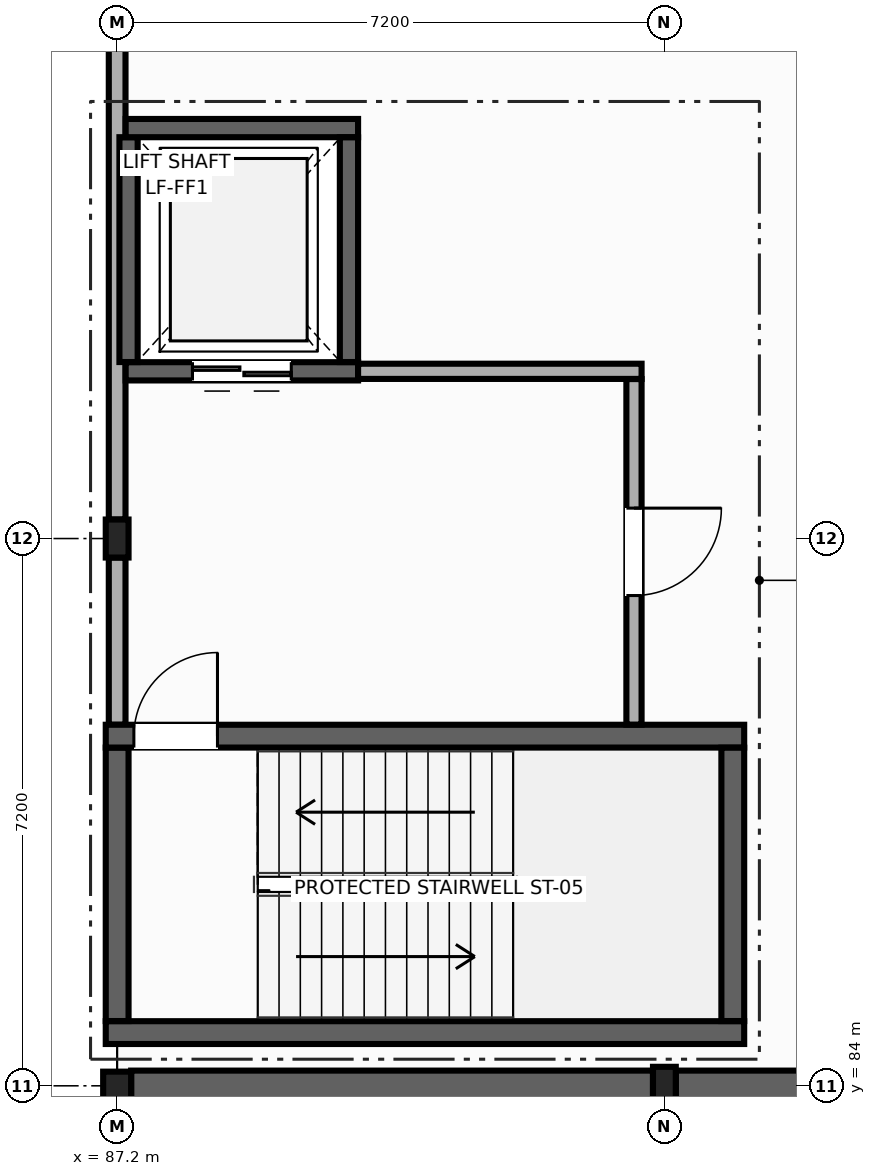
"""IFC4 building model, lengths in metres.
Left out: names, types, materials, properties, quantities, classifications, styles, units other than length and angle.
Written with IfcOpenShell. Run it as: python <this file> out.ifc"""

import sys

from ifc_helpers import new_model, si_unit, direction, frame, frame_2d, origin, origin_2d, place, context, subcontext, project, spatial, rectangle, i_section, extrude, element, fill, save


model = new_model("IFC4")
c1 = context("Model", 3, precision=1e-05, world=origin(), true_north=direction((0.0, 1.0)))
c2 = subcontext(c1, "Body", "Model", "MODEL_VIEW")
j1 = project(units=[si_unit("LENGTHUNIT", "METRE"), si_unit("PLANEANGLEUNIT", "RADIAN")], contexts=[c1])
p1 = place(None, origin())
s1 = spatial("IfcSite", under=j1, at=p1, CompositionType="ELEMENT")
p2 = place(p1, origin())
s2 = spatial("IfcBuilding", under=s1, at=p2, CompositionType="ELEMENT")
p3 = place(p2, frame((0.0, 0.0, 5.4)))
s3 = spatial("IfcBuildingStorey", under=s2, at=p3, CompositionType="ELEMENT", Elevation=5.4)
p4 = place(p3, frame((87.2, 84.0, 0.0), z_axis=(0.0, 0.0, 1.0), x_axis=(0.0, 1.0, 0.0)))
e1 = element("IfcColumn", 1, at=p4, inside=s3, PredefinedType="COLUMN", context=c2, shape_type="SweptSolid", body=[
    extrude(i_section(OverallWidth=0.373, OverallDepth=0.368, WebThickness=0.014, FlangeThickness=0.024, at=origin_2d()), origin(), (0.0, 0.0, 1.0), 4.5),
])
for number, where, z_axis, x_axis in (
    (2, (94.4, 84.0, 0.0), (0.0, 0.0, 1.0), (1.0, 0.0, 0.0)),
    (3, (87.2, 91.2, 0.0), (0.0, 0.0, 1.0), (1.0, 0.0, 0.0)),
):
    element("IfcColumn", number, at=place(p3, frame(where, z_axis=z_axis, x_axis=x_axis)), inside=s3, PredefinedType="COLUMN", context=c2, shape_type="SweptSolid", body=[
        extrude(i_section(OverallWidth=0.3, OverallDepth=0.5, WebThickness=0.014, FlangeThickness=0.028, at=origin_2d()), origin(), (0.0, 0.0, 1.0), 4.5),
    ])
p5 = place(p3, frame((87.2, 88.75, 0.0), z_axis=(0.0, 0.0, 1.0), x_axis=(0.0, 1.0, 0.0)))
e4 = element("IfcWall", 4, at=p5, inside=s3, PredefinedType="SOLIDWALL", context=c2, shape_type="SweptSolid", body=[
    extrude(rectangle(XDim=2.2, YDim=0.22, at=frame_2d((1.1, 0.0))), origin(), (0.0, 0.0, 1.0), 3.515),
])
p6 = place(p3, frame((87.2, 91.45, 0.0), z_axis=(0.0, 0.0, 1.0), x_axis=(0.0, 1.0, 0.0)))
e5 = element("IfcWall", 5, at=p6, inside=s3, PredefinedType="SOLIDWALL", context=c2, shape_type="SweptSolid", body=[
    extrude(rectangle(XDim=6.8, YDim=0.22, at=frame_2d((3.4, 0.0))), origin(), (0.0, 0.0, 1.0), 3.555),
])
p7 = place(p3, frame((95.45, 84.7, 0.0), z_axis=(0.0, 0.0, 1.0), x_axis=(-1.0, 0.0, 0.0)))
e6 = element("IfcWall", 6, at=p7, inside=s3, PredefinedType="SHEAR", context=c2, shape_type="SweptSolid", body=[
    extrude(rectangle(XDim=8.4, YDim=0.3, at=frame_2d((4.2, 0.0))), origin(), (0.0, 0.0, 1.0), 4.26),
])
p8 = place(p3, frame((87.2, 84.852, 0.0), z_axis=(0.0, 0.0, 1.0), x_axis=(0.0, 1.0, 0.0)))
e7 = element("IfcWall", 7, at=p8, inside=s3, PredefinedType="SHEAR", context=c2, shape_type="SweptSolid", body=[
    extrude(rectangle(XDim=3.598, YDim=0.3, at=frame_2d((1.799, 0.0))), origin(), (0.0, 0.0, 1.0), 4.26),
])
p9 = place(p3, frame((87.05, 88.6, 0.0), z_axis=(0.0, 0.0, 1.0), x_axis=(1.0, 0.0, 0.0)))
e8 = element("IfcWall", 8, at=p9, inside=s3, PredefinedType="SHEAR", context=c2, shape_type="SweptSolid", body=[
    extrude(rectangle(XDim=8.4, YDim=0.3, at=frame_2d((4.2, 0.0))), origin(), (0.0, 0.0, 1.0), 4.26),
])
p10 = place(p9, frame((0.37, 0.0, 0.0)))
e9 = element("IfcOpeningElement", 9, at=p10, cuts=e8, PredefinedType="OPENING", context=c2, shape_type="SweptSolid", body=[
    extrude(rectangle(XDim=1.1, YDim=2.15, at=frame_2d((0.55, 1.075))), frame((0.0, 0.16, 0.0), z_axis=(0.0, -1.0, 0.0), x_axis=(1.0, 0.0, 0.0)), (0.0, 0.0, 1.0), 0.32),
])
p11 = place(p3, frame((95.3, 88.448, 0.0), z_axis=(0.0, 0.0, 1.0), x_axis=(0.0, -1.0, 0.0)))
e10 = element("IfcWall", 10, at=p11, inside=s3, PredefinedType="SHEAR", context=c2, shape_type="SweptSolid", body=[
    extrude(rectangle(XDim=3.596, YDim=0.3, at=frame_2d((1.798, 0.0))), origin(), (0.0, 0.0, 1.0), 4.26),
])
p12 = place(p3, frame((90.37, 93.4, 0.0), z_axis=(0.0, 0.0, 1.0), x_axis=(-1.0, 0.0, 0.0)))
e11 = element("IfcWall", 11, at=p12, inside=s3, PredefinedType="SHEAR", context=c2, shape_type="SweptSolid", body=[
    extrude(rectangle(XDim=3.058, YDim=0.24, at=frame_2d((1.529, 0.0))), origin(), (0.0, 0.0, 1.0), 4.26),
])
p13 = place(p12, frame((0.879, 0.0, 0.0)))
e12 = element("IfcOpeningElement", 12, at=p13, cuts=e11, PredefinedType="OPENING", context=c2, shape_type="SweptSolid", body=[
    extrude(rectangle(XDim=1.3, YDim=2.15, at=frame_2d((0.65, 1.075))), frame((0.0, 0.13, 0.0), z_axis=(0.0, -1.0, 0.0), x_axis=(1.0, 0.0, 0.0)), (0.0, 0.0, 1.0), 0.26),
])
p14 = place(p3, frame((87.35, 93.522, 0.0), z_axis=(0.0, 0.0, 1.0), x_axis=(0.0, 1.0, 0.0)))
e13 = element("IfcWall", 13, at=p14, inside=s3, PredefinedType="SHEAR", context=c2, shape_type="SweptSolid", body=[
    extrude(rectangle(XDim=2.958, YDim=0.24, at=frame_2d((1.479, 0.0))), origin(), (0.0, 0.0, 1.0), 4.26),
])
p15 = place(p3, frame((87.312, 96.6, 0.0), z_axis=(0.0, 0.0, 1.0), x_axis=(1.0, 0.0, 0.0)))
e14 = element("IfcWall", 14, at=p15, inside=s3, PredefinedType="SHEAR", context=c2, shape_type="SweptSolid", body=[
    extrude(rectangle(XDim=3.058, YDim=0.24, at=frame_2d((1.529, 0.0))), origin(), (0.0, 0.0, 1.0), 4.26),
])
p16 = place(p3, frame((90.25, 96.478, 0.0), z_axis=(0.0, 0.0, 1.0), x_axis=(0.0, -1.0, 0.0)))
e15 = element("IfcWall", 15, at=p16, inside=s3, PredefinedType="SHEAR", context=c2, shape_type="SweptSolid", body=[
    extrude(rectangle(XDim=2.956, YDim=0.24, at=frame_2d((1.478, 0.0))), origin(), (0.0, 0.0, 1.0), 4.26),
])
p17 = place(p3, frame((90.37, 93.4, 0.0), z_axis=(0.0, 0.0, 1.0), x_axis=(1.0, 0.0, 0.0)))
e16 = element("IfcWall", 16, at=p17, inside=s3, PredefinedType="PARTITIONING", context=c2, shape_type="SweptSolid", body=[
    extrude(rectangle(XDim=3.73, YDim=0.2, at=frame_2d((1.865, 0.0))), origin(), (0.0, 0.0, 1.0), 4.26),
])
p18 = place(p3, frame((94.0, 93.298, 0.0), z_axis=(0.0, 0.0, 1.0), x_axis=(0.0, -1.0, 0.0)))
e17 = element("IfcWall", 17, at=p18, inside=s3, PredefinedType="PARTITIONING", context=c2, shape_type="SweptSolid", body=[
    extrude(rectangle(XDim=4.546, YDim=0.2, at=frame_2d((2.273, 0.0))), origin(), (0.0, 0.0, 1.0), 4.26),
])
p19 = place(p18, frame((1.698, 0.0, 0.0)))
e18 = element("IfcOpeningElement", 18, at=p19, cuts=e17, PredefinedType="OPENING", context=c2, shape_type="SweptSolid", body=[
    extrude(rectangle(XDim=1.15, YDim=2.15, at=frame_2d((0.575, 1.075))), frame((0.0, 0.11, 0.0), z_axis=(0.0, -1.0, 0.0), x_axis=(1.0, 0.0, 0.0)), (0.0, 0.0, 1.0), 0.22),
])
p20 = place(p3, frame((87.384, 84.0, 0.0), z_axis=(0.0, 0.0, 1.0), x_axis=(1.0, 0.0, 0.0)))
e19 = element("IfcWall", 19, at=p20, inside=s3, PredefinedType="SHEAR", context=c2, shape_type="SweptSolid", body=[
    extrude(rectangle(XDim=6.866, YDim=0.4, at=frame_2d((3.433, 0.0))), origin(), (0.0, 0.0, 1.0), 4.22),
])
p21 = place(p3, frame((94.55, 84.0, 0.0), z_axis=(0.0, 0.0, 1.0), x_axis=(1.0, 0.0, 0.0)))
e20 = element("IfcWall", 20, at=p21, inside=s3, PredefinedType="SHEAR", context=c2, shape_type="SweptSolid", body=[
    extrude(rectangle(XDim=6.8, YDim=0.4, at=frame_2d((3.4, 0.0))), origin(), (0.0, 0.0, 1.0), 4.26),
])
p22 = place(p10, origin())
e21 = element("IfcDoor", 21, at=p22, inside=s3, OperationType="SINGLE_SWING_RIGHT", PredefinedType="DOOR", context=c2, shape_type="SweptSolid", body=[
    extrude(rectangle(XDim=1.1, YDim=2.15, at=frame_2d((0.55, 1.075))), frame((0.0, 0.025, 0.0), z_axis=(0.0, -1.0, 0.0), x_axis=(1.0, 0.0, 0.0)), (0.0, 0.0, 1.0), 0.05),
])
fill(e9, e21)
p23 = place(p13, origin())
e22 = element("IfcDoor", 22, at=p23, inside=s3, OperationType="DOUBLE_DOOR_SLIDING", PredefinedType="DOOR", context=c2, shape_type="SweptSolid", body=[
    extrude(rectangle(XDim=1.3, YDim=2.15, at=frame_2d((0.65, 1.075))), frame((0.0, 0.025, 0.0), z_axis=(0.0, -1.0, 0.0), x_axis=(1.0, 0.0, 0.0)), (0.0, 0.0, 1.0), 0.05),
])
fill(e12, e22)
p24 = place(p19, origin())
e23 = element("IfcDoor", 23, at=p24, inside=s3, OperationType="SINGLE_SWING_LEFT", PredefinedType="DOOR", context=c2, shape_type="SweptSolid", body=[
    extrude(rectangle(XDim=1.15, YDim=2.15, at=frame_2d((0.575, 1.075))), frame((0.0, 0.025, 0.0), z_axis=(0.0, -1.0, 0.0), x_axis=(1.0, 0.0, 0.0)), (0.0, 0.0, 1.0), 0.05),
])
fill(e18, e23)
save(model, sys.argv[1])
